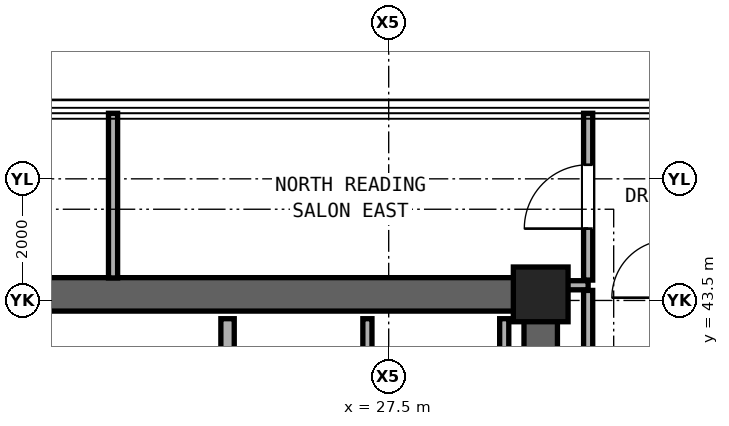
"""IFC4 building model, lengths in metres.
Left out: names, types, materials, properties, quantities, classifications, styles, units other than length and angle.
Written with IfcOpenShell. Run it as: python <this file> out.ifc"""

import sys

from ifc_helpers import new_model, si_unit, direction, frame, frame_2d, origin, origin_2d, place, context, subcontext, project, spatial, rectangle, extrude, element, fill, save


model = new_model("IFC4")
c1 = context("Model", 3, precision=1e-05, world=origin(), true_north=direction((0.0, 1.0)))
c2 = subcontext(c1, "Body", "Model", "MODEL_VIEW")
j1 = project(units=[si_unit("LENGTHUNIT", "METRE"), si_unit("PLANEANGLEUNIT", "RADIAN")], contexts=[c1])
p1 = place(None, origin())
s1 = spatial("IfcSite", under=j1, at=p1, CompositionType="ELEMENT")
p2 = place(p1, origin())
s2 = spatial("IfcBuilding", under=s1, at=p2, CompositionType="ELEMENT")
p3 = place(p2, frame((0.0, 0.0, 203.15)))
s3 = spatial("IfcBuildingStorey", under=s2, at=p3, CompositionType="ELEMENT", Elevation=203.15)
p4 = place(p3, frame((30.0, 43.6, 0.0), z_axis=(0.0, 0.0, 1.0), x_axis=(1.0, 0.0, 0.0)))
e1 = element("IfcColumn", 1, at=p4, inside=s3, PredefinedType="COLUMN", context=c2, shape_type="SweptSolid", body=[
    extrude(rectangle(XDim=0.9, YDim=0.9, at=origin_2d()), origin(), (0.0, 0.0, 1.0), 3.25),
])
p5 = place(p3, frame((11.0, 43.6, 0.0), z_axis=(0.0, 0.0, 1.0), x_axis=(1.0, 0.0, 0.0)))
e2 = element("IfcWall", 2, at=p5, inside=s3, PredefinedType="SHEAR", context=c2, shape_type="SweptSolid", body=[
    extrude(rectangle(XDim=19.0, YDim=0.55, at=frame_2d((9.5, 0.0))), origin(), (0.0, 0.0, 1.0), 3.05),
])
p6 = place(p3, frame((30.0, 37.6, 0.0), z_axis=(0.0, 0.0, 1.0), x_axis=(0.0, 1.0, 0.0)))
e3 = element("IfcWall", 3, at=p6, inside=s3, PredefinedType="SHEAR", context=c2, shape_type="SweptSolid", body=[
    extrude(rectangle(XDim=6.0, YDim=0.55, at=frame_2d((3.0, 0.0))), origin(), (0.0, 0.0, 1.0), 3.05),
])
p7 = place(p3, frame((30.27, 43.75, 0.0), z_axis=(0.0, 0.0, 1.0), x_axis=(1.0, 0.0, 0.0)))
e4 = element("IfcWall", 4, at=p7, inside=s3, PredefinedType="PARTITIONING", context=c2, shape_type="SweptSolid", body=[
    extrude(rectangle(XDim=0.51, YDim=0.15, at=frame_2d((0.255, 0.0))), origin(), (0.0, 0.0, 1.0), 3.05),
])
p8 = place(p3, frame((22.967, 43.87, 0.0), z_axis=(0.0, 0.0, 1.0), x_axis=(0.0, 1.0, 0.0)))
e5 = element("IfcWall", 5, at=p8, inside=s3, PredefinedType="PARTITIONING", context=c2, shape_type="SweptSolid", body=[
    extrude(rectangle(XDim=2.708, YDim=0.15, at=frame_2d((1.354, 0.0))), origin(), (0.0, 0.0, 1.0), 3.05),
])
p9 = place(p3, frame((24.85, 40.26, 0.0), z_axis=(0.0, 0.0, 1.0), x_axis=(0.0, 1.0, 0.0)))
e6 = element("IfcWall", 6, at=p9, inside=s3, PredefinedType="SOLIDWALL", context=c2, shape_type="SweptSolid", body=[
    extrude(rectangle(XDim=2.94, YDim=0.22, at=frame_2d((1.47, 0.0))), origin(), (0.0, 0.0, 1.0), 3.05),
])
for number, where, z_axis, x_axis in (
    (7, (27.15, 37.87, 0.0), (0.0, 0.0, 1.0), (0.0, 1.0, 0.0)),
    (8, (29.4, 37.87, 0.0), (0.0, 0.0, 1.0), (0.0, 1.0, 0.0)),
):
    element("IfcWall", number, at=place(p3, frame(where, z_axis=z_axis, x_axis=x_axis)), inside=s3, PredefinedType="PARTITIONING", context=c2, shape_type="SweptSolid", body=[
        extrude(rectangle(XDim=5.33, YDim=0.15, at=frame_2d((2.665, 0.0))), origin(), (0.0, 0.0, 1.0), 3.05),
    ])
p10 = place(p3, frame((30.78, 34.57, 0.0), z_axis=(0.0, 0.0, 1.0), x_axis=(0.0, 1.0, 0.0)))
e9 = element("IfcWall", 9, at=p10, inside=s3, PredefinedType="PARTITIONING", context=c2, shape_type="SweptSolid", body=[
    extrude(rectangle(XDim=9.095, YDim=0.15, at=frame_2d((4.547, 0.0))), origin(), (0.0, 0.0, 1.0), 2.442),
])
p11 = place(p3, frame((30.78, 43.835, 0.0), z_axis=(0.0, 0.0, 1.0), x_axis=(0.0, 1.0, 0.0)))
e10 = element("IfcWall", 10, at=p11, inside=s3, PredefinedType="PARTITIONING", context=c2, shape_type="SweptSolid", body=[
    extrude(rectangle(XDim=2.743, YDim=0.15, at=frame_2d((1.372, 0.0))), origin(), (0.0, 0.0, 1.0), 3.05),
])
p12 = place(p11, frame((0.846, 0.0, 0.0)))
e11 = element("IfcOpeningElement", 11, at=p12, cuts=e10, PredefinedType="OPENING", context=c2, shape_type="SweptSolid", body=[
    extrude(rectangle(XDim=1.05, YDim=2.2, at=frame_2d((0.525, 1.1))), frame((0.0, 0.085, 0.0), z_axis=(0.0, -1.0, 0.0), x_axis=(1.0, 0.0, 0.0)), (0.0, 0.0, 1.0), 0.17),
])
p13 = place(p12, origin())
e12 = element("IfcDoor", 12, at=p13, inside=s3, OperationType="SINGLE_SWING_LEFT", PredefinedType="DOOR", context=c2, shape_type="SweptSolid", body=[
    extrude(rectangle(XDim=1.05, YDim=2.2, at=frame_2d((0.525, 1.1))), frame((0.0, 0.025, 0.0), z_axis=(0.0, -1.0, 0.0), x_axis=(1.0, 0.0, 0.0)), (0.0, 0.0, 1.0), 0.05),
])
fill(e11, e12)
save(model, sys.argv[1])
